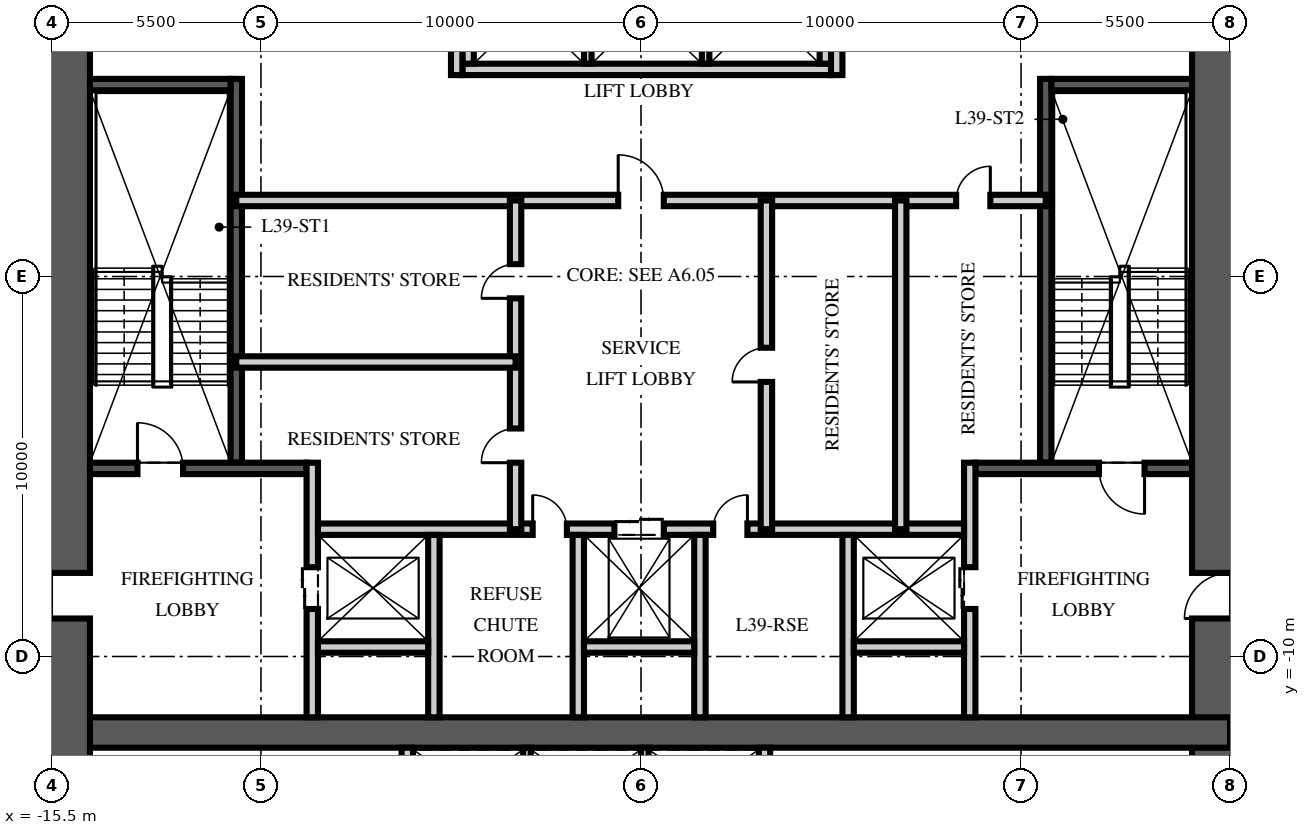
"""IFC4 building model, lengths in metres.
Left out: names, types, materials, properties, quantities, classifications, styles, units other than length and angle.
Written with IfcOpenShell. Run it as: python <this file> out.ifc"""

import sys

from ifc_helpers import new_model, si_unit, direction, frame, frame_2d, origin, place, context, subcontext, project, spatial, rectangle, extrude, element, fill, save


model = new_model("IFC4")
c1 = context("Model", 3, precision=1e-05, world=origin(), true_north=direction((0.0, 1.0)))
c2 = subcontext(c1, "Body", "Model", "MODEL_VIEW")
j1 = project(units=[si_unit("LENGTHUNIT", "METRE"), si_unit("PLANEANGLEUNIT", "RADIAN")], contexts=[c1])
p1 = place(None, origin())
s1 = spatial("IfcSite", under=j1, at=p1, CompositionType="ELEMENT")
p2 = place(p1, origin())
s2 = spatial("IfcBuilding", under=s1, at=p2, CompositionType="ELEMENT")
p3 = place(p2, frame((0.0, 0.0, 156.0)))
s3 = spatial("IfcBuildingStorey", under=s2, at=p3, CompositionType="ELEMENT", Elevation=156.0)
p4 = place(p3, frame((15.5, -15.5, -0.25), z_axis=(0.0, 0.0, 1.0), x_axis=(0.0, 1.0, 0.0)))
e1 = element("IfcWall", 1, at=p4, inside=s3, PredefinedType="SHEAR", context=c2, shape_type="SweptSolid", body=[
    extrude(rectangle(XDim=31.0, YDim=2.0, at=frame_2d((15.5, 0.0))), origin(), (0.0, 0.0, 1.0), 3.75),
])
p5 = place(p4, frame((6.5, 0.0, 0.25)))
e2 = element("IfcOpeningElement", 2, at=p5, cuts=e1, PredefinedType="OPENING", context=c2, shape_type="SweptSolid", body=[
    extrude(rectangle(XDim=1.2, YDim=2.1, at=frame_2d((0.6, 1.05))), frame((0.0, 1.01, 0.0), z_axis=(0.0, -1.0, 0.0), x_axis=(1.0, 0.0, 0.0)), (0.0, 0.0, 1.0), 2.02),
])
p6 = place(p4, frame((23.0, 0.0, 0.25)))
e3 = element("IfcOpeningElement", 3, at=p6, cuts=e1, PredefinedType="OPENING", context=c2, shape_type="SweptSolid", body=[
    extrude(rectangle(XDim=1.8, YDim=2.1, at=frame_2d((0.9, 1.05))), frame((0.0, 1.01, 0.0), z_axis=(0.0, -1.0, 0.0), x_axis=(1.0, 0.0, 0.0)), (0.0, 0.0, 1.0), 2.02),
])
p7 = place(p3, frame((-15.5, -12.0, -0.25), z_axis=(0.0, 0.0, 1.0), x_axis=(1.0, 0.0, 0.0)))
e4 = element("IfcWall", 4, at=p7, inside=s3, PredefinedType="SHEAR", context=c2, shape_type="SweptSolid", body=[
    extrude(rectangle(XDim=31.0, YDim=0.8, at=frame_2d((15.5, 0.0))), origin(), (0.0, 0.0, 1.0), 3.75),
])
p8 = place(p3, frame((-15.5, -15.5, -0.25), z_axis=(0.0, 0.0, 1.0), x_axis=(0.0, 1.0, 0.0)))
e5 = element("IfcWall", 5, at=p8, inside=s3, PredefinedType="SHEAR", context=c2, shape_type="SweptSolid", body=[
    extrude(rectangle(XDim=31.0, YDim=2.0, at=frame_2d((15.5, 0.0))), origin(), (0.0, 0.0, 1.0), 3.75),
])
p9 = place(p8, frame((6.5, 0.0, 0.25)))
e6 = element("IfcOpeningElement", 6, at=p9, cuts=e5, PredefinedType="OPENING", context=c2, shape_type="SweptSolid", body=[
    extrude(rectangle(XDim=1.2, YDim=2.1, at=frame_2d((0.6, 1.05))), frame((0.0, 1.01, 0.0), z_axis=(0.0, -1.0, 0.0), x_axis=(1.0, 0.0, 0.0)), (0.0, 0.0, 1.0), 2.02),
])
p10 = place(p8, frame((23.0, 0.0, 0.25)))
e7 = element("IfcOpeningElement", 7, at=p10, cuts=e5, PredefinedType="OPENING", context=c2, shape_type="SweptSolid", body=[
    extrude(rectangle(XDim=1.8, YDim=2.1, at=frame_2d((0.9, 1.05))), frame((0.0, 1.01, 0.0), z_axis=(0.0, -1.0, 0.0), x_axis=(1.0, 0.0, 0.0)), (0.0, 0.0, 1.0), 2.02),
])
p11 = place(p3, frame((-10.65, -4.9, 0.0), z_axis=(0.0, 0.0, 1.0), x_axis=(0.0, 1.0, 0.0)))
e8 = element("IfcWall", 8, at=p11, inside=s3, PredefinedType="SOLIDWALL", context=c2, shape_type="SweptSolid", body=[
    extrude(rectangle(XDim=10.1, YDim=0.3, at=frame_2d((5.05, 0.0))), origin(), (0.0, 0.0, 1.0), 3.5),
])
p12 = place(p3, frame((-14.5, -5.05, 0.0), z_axis=(0.0, 0.0, 1.0), x_axis=(1.0, 0.0, 0.0)))
e9 = element("IfcWall", 9, at=p12, inside=s3, PredefinedType="SOLIDWALL", context=c2, shape_type="SweptSolid", body=[
    extrude(rectangle(XDim=5.7, YDim=0.3, at=frame_2d((2.85, 0.0))), origin(), (0.0, 0.0, 1.0), 3.5),
])
p13 = place(p12, frame((1.25, 0.0, 0.0)))
e10 = element("IfcOpeningElement", 10, at=p13, cuts=e9, PredefinedType="OPENING", context=c2, shape_type="SweptSolid", body=[
    extrude(rectangle(XDim=1.2, YDim=2.1, at=frame_2d((0.6, 1.05))), frame((0.0, 0.16, 0.0), z_axis=(0.0, -1.0, 0.0), x_axis=(1.0, 0.0, 0.0)), (0.0, 0.0, 1.0), 0.32),
])
p14 = place(p3, frame((-14.5, 5.05, 0.0), z_axis=(0.0, 0.0, 1.0), x_axis=(1.0, 0.0, 0.0)))
e11 = element("IfcWall", 11, at=p14, inside=s3, PredefinedType="SOLIDWALL", context=c2, shape_type="SweptSolid", body=[
    extrude(rectangle(XDim=3.7, YDim=0.3, at=frame_2d((1.85, 0.0))), origin(), (0.0, 0.0, 1.0), 3.5),
])
p15 = place(p3, frame((-8.65, -11.6, 0.0), z_axis=(0.0, 0.0, 1.0), x_axis=(0.0, 1.0, 0.0)))
e12 = element("IfcWall", 12, at=p15, inside=s3, PredefinedType="PARTITIONING", context=c2, shape_type="SweptSolid", body=[
    extrude(rectangle(XDim=6.7, YDim=0.3, at=frame_2d((3.35, 0.0))), origin(), (0.0, 0.0, 1.0), 3.5),
])
p16 = place(p15, frame((2.85, 0.0, 0.0)))
e13 = element("IfcOpeningElement", 13, at=p16, cuts=e12, PredefinedType="OPENING", context=c2, shape_type="SweptSolid", body=[
    extrude(rectangle(XDim=1.1, YDim=2.1, at=frame_2d((0.55, 1.05))), frame((0.0, 0.16, 0.0), z_axis=(0.0, -1.0, 0.0), x_axis=(1.0, 0.0, 0.0)), (0.0, 0.0, 1.0), 0.32),
])
p17 = place(p3, frame((10.65, -4.9, 0.0), z_axis=(0.0, 0.0, 1.0), x_axis=(0.0, 1.0, 0.0)))
e14 = element("IfcWall", 14, at=p17, inside=s3, PredefinedType="SOLIDWALL", context=c2, shape_type="SweptSolid", body=[
    extrude(rectangle(XDim=10.1, YDim=0.3, at=frame_2d((5.05, 0.0))), origin(), (0.0, 0.0, 1.0), 3.5),
])
p18 = place(p3, frame((14.5, -5.05, 0.0), z_axis=(0.0, 0.0, 1.0), x_axis=(-1.0, 0.0, 0.0)))
e15 = element("IfcWall", 15, at=p18, inside=s3, PredefinedType="SOLIDWALL", context=c2, shape_type="SweptSolid", body=[
    extrude(rectangle(XDim=5.7, YDim=0.3, at=frame_2d((2.85, 0.0))), origin(), (0.0, 0.0, 1.0), 3.5),
])
p19 = place(p18, frame((1.25, 0.0, 0.0)))
e16 = element("IfcOpeningElement", 16, at=p19, cuts=e15, PredefinedType="OPENING", context=c2, shape_type="SweptSolid", body=[
    extrude(rectangle(XDim=1.2, YDim=2.1, at=frame_2d((0.6, 1.05))), frame((0.0, 0.16, 0.0), z_axis=(0.0, -1.0, 0.0), x_axis=(1.0, 0.0, 0.0)), (0.0, 0.0, 1.0), 0.32),
])
p20 = place(p3, frame((14.5, 5.05, 0.0), z_axis=(0.0, 0.0, 1.0), x_axis=(-1.0, 0.0, 0.0)))
e17 = element("IfcWall", 17, at=p20, inside=s3, PredefinedType="SOLIDWALL", context=c2, shape_type="SweptSolid", body=[
    extrude(rectangle(XDim=3.7, YDim=0.3, at=frame_2d((1.85, 0.0))), origin(), (0.0, 0.0, 1.0), 3.5),
])
p21 = place(p3, frame((8.65, -11.6, 0.0), z_axis=(0.0, 0.0, 1.0), x_axis=(0.0, 1.0, 0.0)))
e18 = element("IfcWall", 18, at=p21, inside=s3, PredefinedType="PARTITIONING", context=c2, shape_type="SweptSolid", body=[
    extrude(rectangle(XDim=6.7, YDim=0.3, at=frame_2d((3.35, 0.0))), origin(), (0.0, 0.0, 1.0), 3.5),
])
p22 = place(p21, frame((2.85, 0.0, 0.0)))
e19 = element("IfcOpeningElement", 19, at=p22, cuts=e18, PredefinedType="OPENING", context=c2, shape_type="SweptSolid", body=[
    extrude(rectangle(XDim=1.1, YDim=2.1, at=frame_2d((0.55, 1.05))), frame((0.0, 0.16, 0.0), z_axis=(0.0, -1.0, 0.0), x_axis=(1.0, 0.0, 0.0)), (0.0, 0.0, 1.0), 0.32),
])
p23 = place(p3, frame((-8.5, -6.65, 0.0), z_axis=(0.0, 0.0, 1.0), x_axis=(1.0, 0.0, 0.0)))
e20 = element("IfcWall", 20, at=p23, inside=s3, PredefinedType="PARTITIONING", context=c2, shape_type="SweptSolid", body=[
    extrude(rectangle(XDim=17.0, YDim=0.3, at=frame_2d((8.5, 0.0))), origin(), (0.0, 0.0, 1.0), 3.5),
])
p24 = place(p23, frame((7.8, 0.0, 0.0)))
e21 = element("IfcOpeningElement", 21, at=p24, cuts=e20, PredefinedType="OPENING", context=c2, shape_type="SweptSolid", body=[
    extrude(rectangle(XDim=1.3, YDim=2.4, at=frame_2d((0.65, 1.2))), frame((0.0, 0.16, 0.0), z_axis=(0.0, -1.0, 0.0), x_axis=(1.0, 0.0, 0.0)), (0.0, 0.0, 1.0), 0.32),
])
p25 = place(p23, frame((5.65, 0.0, 0.0)))
e22 = element("IfcOpeningElement", 22, at=p25, cuts=e20, PredefinedType="OPENING", context=c2, shape_type="SweptSolid", body=[
    extrude(rectangle(XDim=0.9, YDim=2.1, at=frame_2d((0.45, 1.05))), frame((0.0, 0.16, 0.0), z_axis=(0.0, -1.0, 0.0), x_axis=(1.0, 0.0, 0.0)), (0.0, 0.0, 1.0), 0.32),
])
p26 = place(p23, frame((10.4, 0.0, 0.0)))
e23 = element("IfcOpeningElement", 23, at=p26, cuts=e20, PredefinedType="OPENING", context=c2, shape_type="SweptSolid", body=[
    extrude(rectangle(XDim=0.9, YDim=2.1, at=frame_2d((0.45, 1.05))), frame((0.0, 0.16, 0.0), z_axis=(0.0, -1.0, 0.0), x_axis=(1.0, 0.0, 0.0)), (0.0, 0.0, 1.0), 0.32),
])
for number, where, z_axis, x_axis in (
    (24, (-5.45, -11.6, 0.0), (0.0, 0.0, 1.0), (0.0, 1.0, 0.0)),
    (25, (-1.65, -11.6, 0.0), (0.0, 0.0, 1.0), (0.0, 1.0, 0.0)),
    (26, (1.55, -11.6, 0.0), (0.0, 0.0, 1.0), (0.0, 1.0, 0.0)),
    (27, (5.45, -11.6, 0.0), (0.0, 0.0, 1.0), (0.0, 1.0, 0.0)),
):
    element("IfcWall", number, at=place(p3, frame(where, z_axis=z_axis, x_axis=x_axis)), inside=s3, PredefinedType="PARTITIONING", context=c2, shape_type="SweptSolid", body=[
        extrude(rectangle(XDim=4.8, YDim=0.3, at=frame_2d((2.4, 0.0))), origin(), (0.0, 0.0, 1.0), 3.5),
    ])
for number, where, z_axis, x_axis in (
    (28, (-8.5, -9.75, 0.0), (0.0, 0.0, 1.0), (1.0, 0.0, 0.0)),
    (29, (-1.5, -9.75, 0.0), (0.0, 0.0, 1.0), (1.0, 0.0, 0.0)),
    (30, (5.6, -9.75, 0.0), (0.0, 0.0, 1.0), (1.0, 0.0, 0.0)),
):
    element("IfcWall", number, at=place(p3, frame(where, z_axis=z_axis, x_axis=x_axis)), inside=s3, PredefinedType="PARTITIONING", context=c2, shape_type="SweptSolid", body=[
        extrude(rectangle(XDim=2.9, YDim=0.3, at=frame_2d((1.45, 0.0))), origin(), (0.0, 0.0, 1.0), 3.5),
    ])
p27 = place(p3, frame((-4.7, 5.45, 0.0), z_axis=(0.0, 0.0, 1.0), x_axis=(1.0, 0.0, 0.0)))
e31 = element("IfcWall", 31, at=p27, inside=s3, PredefinedType="PARTITIONING", context=c2, shape_type="SweptSolid", body=[
    extrude(rectangle(XDim=9.7, YDim=0.3, at=frame_2d((4.85, 0.0))), origin(), (0.0, 0.0, 1.0), 3.5),
])
for number, where, z_axis, x_axis in (
    (32, (-4.55, 5.6, 0.0), (0.0, 0.0, 1.0), (0.0, 1.0, 0.0)),
    (33, (4.85, 5.6, 0.0), (0.0, 0.0, 1.0), (0.0, 1.0, 0.0)),
):
    element("IfcWall", number, at=place(p3, frame(where, z_axis=z_axis, x_axis=x_axis)), inside=s3, PredefinedType="PARTITIONING", context=c2, shape_type="SweptSolid", body=[
        extrude(rectangle(XDim=2.8, YDim=0.3, at=frame_2d((1.4, 0.0))), origin(), (0.0, 0.0, 1.0), 3.5),
    ])
for number, where, z_axis, x_axis in (
    (34, (-1.4, 5.6, 0.0), (0.0, 0.0, 1.0), (0.0, 1.0, 0.0)),
    (35, (1.7, 5.6, 0.0), (0.0, 0.0, 1.0), (0.0, 1.0, 0.0)),
):
    element("IfcWall", number, at=place(p3, frame(where, z_axis=z_axis, x_axis=x_axis)), inside=s3, PredefinedType="PARTITIONING", context=c2, shape_type="SweptSolid", body=[
        extrude(rectangle(XDim=2.8, YDim=0.2, at=frame_2d((1.4, 0.0))), origin(), (0.0, 0.0, 1.0), 3.5),
    ])
for number, where, z_axis, x_axis in (
    (36, (-6.15, -14.5, 0.0), (0.0, 0.0, 1.0), (0.0, 1.0, 0.0)),
    (37, (3.25, -14.5, 0.0), (0.0, 0.0, 1.0), (0.0, 1.0, 0.0)),
):
    element("IfcWall", number, at=place(p3, frame(where, z_axis=z_axis, x_axis=x_axis)), inside=s3, PredefinedType="PARTITIONING", context=c2, shape_type="SweptSolid", body=[
        extrude(rectangle(XDim=2.1, YDim=0.3, at=frame_2d((1.05, 0.0))), origin(), (0.0, 0.0, 1.0), 3.5),
    ])
for number, where, z_axis, x_axis in (
    (38, (-3.0, -14.5, 0.0), (0.0, 0.0, 1.0), (0.0, 1.0, 0.0)),
    (39, (0.1, -14.5, 0.0), (0.0, 0.0, 1.0), (0.0, 1.0, 0.0)),
):
    element("IfcWall", number, at=place(p3, frame(where, z_axis=z_axis, x_axis=x_axis)), inside=s3, PredefinedType="PARTITIONING", context=c2, shape_type="SweptSolid", body=[
        extrude(rectangle(XDim=2.1, YDim=0.2, at=frame_2d((1.05, 0.0))), origin(), (0.0, 0.0, 1.0), 3.5),
    ])
p28 = place(p3, frame((-10.65, 2.0, 0.0), z_axis=(0.0, 0.0, 1.0), x_axis=(1.0, 0.0, 0.0)))
e40 = element("IfcWall", 40, at=p28, inside=s3, PredefinedType="PARTITIONING", context=c2, shape_type="SweptSolid", body=[
    extrude(rectangle(XDim=21.3, YDim=0.3, at=frame_2d((10.65, 0.0))), origin(), (0.0, 0.0, 1.0), 3.5),
])
p29 = place(p28, frame((10.05, 0.0, 0.0)))
e41 = element("IfcOpeningElement", 41, at=p29, cuts=e40, PredefinedType="OPENING", context=c2, shape_type="SweptSolid", body=[
    extrude(rectangle(XDim=1.2, YDim=2.1, at=frame_2d((0.6, 1.05))), frame((0.0, 0.16, 0.0), z_axis=(0.0, -1.0, 0.0), x_axis=(1.0, 0.0, 0.0)), (0.0, 0.0, 1.0), 0.32),
])
p30 = place(p28, frame((18.942, 0.0, 0.0)))
e42 = element("IfcOpeningElement", 42, at=p30, cuts=e40, PredefinedType="OPENING", context=c2, shape_type="SweptSolid", body=[
    extrude(rectangle(XDim=0.9, YDim=2.1, at=frame_2d((0.45, 1.05))), frame((0.0, 0.16, 0.0), z_axis=(0.0, -1.0, 0.0), x_axis=(1.0, 0.0, 0.0)), (0.0, 0.0, 1.0), 0.32),
])
p31 = place(p3, frame((-3.3, -6.65, 0.0), z_axis=(0.0, 0.0, 1.0), x_axis=(0.0, 1.0, 0.0)))
e43 = element("IfcWall", 43, at=p31, inside=s3, PredefinedType="PARTITIONING", context=c2, shape_type="SweptSolid", body=[
    extrude(rectangle(XDim=8.65, YDim=0.3, at=frame_2d((4.325, 0.0))), origin(), (0.0, 0.0, 1.0), 3.5),
])
p32 = place(p31, frame((1.75, 0.0, 0.0)))
e44 = element("IfcOpeningElement", 44, at=p32, cuts=e43, PredefinedType="OPENING", context=c2, shape_type="SweptSolid", body=[
    extrude(rectangle(XDim=0.9, YDim=2.1, at=frame_2d((0.45, 1.05))), frame((0.0, 0.16, 0.0), z_axis=(0.0, -1.0, 0.0), x_axis=(1.0, 0.0, 0.0)), (0.0, 0.0, 1.0), 0.32),
])
p33 = place(p31, frame((6.075, 0.0, 0.0)))
e45 = element("IfcOpeningElement", 45, at=p33, cuts=e43, PredefinedType="OPENING", context=c2, shape_type="SweptSolid", body=[
    extrude(rectangle(XDim=0.9, YDim=2.1, at=frame_2d((0.45, 1.05))), frame((0.0, 0.16, 0.0), z_axis=(0.0, -1.0, 0.0), x_axis=(1.0, 0.0, 0.0)), (0.0, 0.0, 1.0), 0.32),
])
p34 = place(p3, frame((3.3, -6.65, 0.0), z_axis=(0.0, 0.0, 1.0), x_axis=(0.0, 1.0, 0.0)))
e46 = element("IfcWall", 46, at=p34, inside=s3, PredefinedType="PARTITIONING", context=c2, shape_type="SweptSolid", body=[
    extrude(rectangle(XDim=8.65, YDim=0.3, at=frame_2d((4.325, 0.0))), origin(), (0.0, 0.0, 1.0), 3.5),
])
p35 = place(p34, frame((3.875, 0.0, 0.0)))
e47 = element("IfcOpeningElement", 47, at=p35, cuts=e46, PredefinedType="OPENING", context=c2, shape_type="SweptSolid", body=[
    extrude(rectangle(XDim=0.9, YDim=2.1, at=frame_2d((0.45, 1.05))), frame((0.0, 0.16, 0.0), z_axis=(0.0, -1.0, 0.0), x_axis=(1.0, 0.0, 0.0)), (0.0, 0.0, 1.0), 0.32),
])
p36 = place(p3, frame((-10.65, -2.25, 0.0), z_axis=(0.0, 0.0, 1.0), x_axis=(1.0, 0.0, 0.0)))
e48 = element("IfcWall", 48, at=p36, inside=s3, PredefinedType="PARTITIONING", context=c2, shape_type="SweptSolid", body=[
    extrude(rectangle(XDim=7.35, YDim=0.3, at=frame_2d((3.675, 0.0))), origin(), (0.0, 0.0, 1.0), 3.5),
])
p37 = place(p3, frame((6.834, -6.65, 0.0), z_axis=(0.0, 0.0, 1.0), x_axis=(0.0, 1.0, 0.0)))
e49 = element("IfcWall", 49, at=p37, inside=s3, PredefinedType="PARTITIONING", context=c2, shape_type="SweptSolid", body=[
    extrude(rectangle(XDim=8.65, YDim=0.3, at=frame_2d((4.325, 0.0))), origin(), (0.0, 0.0, 1.0), 3.5),
])
p38 = place(p3, frame((-4.85, 5.3, 0.0), z_axis=(0.0, 0.0, 1.0), x_axis=(0.0, 1.0, 0.0)))
e50 = element("IfcWall", 50, at=p38, inside=s3, PredefinedType="PARTITIONING", context=c2, shape_type="SweptSolid", body=[
    extrude(rectangle(XDim=6.3, YDim=0.3, at=frame_2d((3.15, 0.0))), origin(), (0.0, 0.0, 1.0), 3.5),
])
p39 = place(p3, frame((5.15, 5.3, 0.0), z_axis=(0.0, 0.0, 1.0), x_axis=(0.0, 1.0, 0.0)))
e51 = element("IfcWall", 51, at=p39, inside=s3, PredefinedType="PARTITIONING", context=c2, shape_type="SweptSolid", body=[
    extrude(rectangle(XDim=6.3, YDim=0.3, at=frame_2d((3.15, 0.0))), origin(), (0.0, 0.0, 1.0), 3.5),
])
p40 = place(p39, frame((4.35, 0.0, 0.0)))
e52 = element("IfcOpeningElement", 52, at=p40, cuts=e51, PredefinedType="OPENING", context=c2, shape_type="SweptSolid", body=[
    extrude(rectangle(XDim=0.9, YDim=2.1, at=frame_2d((0.45, 1.05))), frame((0.0, 0.16, 0.0), z_axis=(0.0, -1.0, 0.0), x_axis=(1.0, 0.0, 0.0)), (0.0, 0.0, 1.0), 0.32),
])
p41 = place(p13, origin())
e53 = element("IfcDoor", 53, at=p41, inside=s3, OperationType="SINGLE_SWING_LEFT", PredefinedType="DOOR", context=c2, shape_type="SweptSolid", body=[
    extrude(rectangle(XDim=1.2, YDim=2.1, at=frame_2d((0.6, 1.05))), frame((0.0, 0.025, 0.0), z_axis=(0.0, -1.0, 0.0), x_axis=(1.0, 0.0, 0.0)), (0.0, 0.0, 1.0), 0.05),
])
fill(e10, e53)
p42 = place(p9, origin())
e54 = element("IfcDoor", 54, at=p42, inside=s3, OperationType="SINGLE_SWING_LEFT", PredefinedType="DOOR", context=c2, shape_type="SweptSolid", body=[
    extrude(rectangle(XDim=1.2, YDim=2.1, at=frame_2d((0.6, 1.05))), frame((0.0, 0.025, 0.0), z_axis=(0.0, -1.0, 0.0), x_axis=(1.0, 0.0, 0.0)), (0.0, 0.0, 1.0), 0.05),
])
fill(e6, e54)
p43 = place(p19, origin())
e55 = element("IfcDoor", 55, at=p43, inside=s3, OperationType="SINGLE_SWING_LEFT", PredefinedType="DOOR", context=c2, shape_type="SweptSolid", body=[
    extrude(rectangle(XDim=1.2, YDim=2.1, at=frame_2d((0.6, 1.05))), frame((0.0, 0.025, 0.0), z_axis=(0.0, -1.0, 0.0), x_axis=(1.0, 0.0, 0.0)), (0.0, 0.0, 1.0), 0.05),
])
fill(e16, e55)
p44 = place(p5, origin())
e56 = element("IfcDoor", 56, at=p44, inside=s3, OperationType="SINGLE_SWING_LEFT", PredefinedType="DOOR", context=c2, shape_type="SweptSolid", body=[
    extrude(rectangle(XDim=1.2, YDim=2.1, at=frame_2d((0.6, 1.05))), frame((0.0, 0.025, 0.0), z_axis=(0.0, -1.0, 0.0), x_axis=(1.0, 0.0, 0.0)), (0.0, 0.0, 1.0), 0.05),
])
fill(e2, e56)
p45 = place(p16, origin())
e57 = element("IfcDoor", 57, at=p45, inside=s3, OperationType="DOUBLE_DOOR_SLIDING", PredefinedType="DOOR", context=c2, shape_type="SweptSolid", body=[
    extrude(rectangle(XDim=1.1, YDim=2.1, at=frame_2d((0.55, 1.05))), frame((0.0, 0.025, 0.0), z_axis=(0.0, -1.0, 0.0), x_axis=(1.0, 0.0, 0.0)), (0.0, 0.0, 1.0), 0.05),
])
fill(e13, e57)
p46 = place(p22, origin())
e58 = element("IfcDoor", 58, at=p46, inside=s3, OperationType="DOUBLE_DOOR_SLIDING", PredefinedType="DOOR", context=c2, shape_type="SweptSolid", body=[
    extrude(rectangle(XDim=1.1, YDim=2.1, at=frame_2d((0.55, 1.05))), frame((0.0, 0.025, 0.0), z_axis=(0.0, -1.0, 0.0), x_axis=(1.0, 0.0, 0.0)), (0.0, 0.0, 1.0), 0.05),
])
fill(e19, e58)
p47 = place(p24, origin())
e59 = element("IfcDoor", 59, at=p47, inside=s3, OperationType="DOUBLE_DOOR_SLIDING", PredefinedType="DOOR", context=c2, shape_type="SweptSolid", body=[
    extrude(rectangle(XDim=1.3, YDim=2.4, at=frame_2d((0.65, 1.2))), frame((0.0, 0.025, 0.0), z_axis=(0.0, -1.0, 0.0), x_axis=(1.0, 0.0, 0.0)), (0.0, 0.0, 1.0), 0.05),
])
fill(e21, e59)
p48 = place(p29, origin())
e60 = element("IfcDoor", 60, at=p48, inside=s3, OperationType="SINGLE_SWING_LEFT", PredefinedType="DOOR", context=c2, shape_type="SweptSolid", body=[
    extrude(rectangle(XDim=1.2, YDim=2.1, at=frame_2d((0.6, 1.05))), frame((0.0, 0.025, 0.0), z_axis=(0.0, -1.0, 0.0), x_axis=(1.0, 0.0, 0.0)), (0.0, 0.0, 1.0), 0.05),
])
fill(e41, e60)
p49 = place(p25, origin())
e61 = element("IfcDoor", 61, at=p49, inside=s3, OperationType="SINGLE_SWING_LEFT", PredefinedType="DOOR", context=c2, shape_type="SweptSolid", body=[
    extrude(rectangle(XDim=0.9, YDim=2.1, at=frame_2d((0.45, 1.05))), frame((0.0, 0.025, 0.0), z_axis=(0.0, -1.0, 0.0), x_axis=(1.0, 0.0, 0.0)), (0.0, 0.0, 1.0), 0.05),
])
fill(e22, e61)
p50 = place(p26, origin())
e62 = element("IfcDoor", 62, at=p50, inside=s3, OperationType="SINGLE_SWING_RIGHT", PredefinedType="DOOR", context=c2, shape_type="SweptSolid", body=[
    extrude(rectangle(XDim=0.9, YDim=2.1, at=frame_2d((0.45, 1.05))), frame((0.0, 0.025, 0.0), z_axis=(0.0, -1.0, 0.0), x_axis=(1.0, 0.0, 0.0)), (0.0, 0.0, 1.0), 0.05),
])
fill(e23, e62)
p51 = place(p32, origin())
e63 = element("IfcDoor", 63, at=p51, inside=s3, OperationType="SINGLE_SWING_LEFT", PredefinedType="DOOR", context=c2, shape_type="SweptSolid", body=[
    extrude(rectangle(XDim=0.9, YDim=2.1, at=frame_2d((0.45, 1.05))), frame((0.0, 0.025, 0.0), z_axis=(0.0, -1.0, 0.0), x_axis=(1.0, 0.0, 0.0)), (0.0, 0.0, 1.0), 0.05),
])
fill(e44, e63)
p52 = place(p33, origin())
e64 = element("IfcDoor", 64, at=p52, inside=s3, OperationType="SINGLE_SWING_LEFT", PredefinedType="DOOR", context=c2, shape_type="SweptSolid", body=[
    extrude(rectangle(XDim=0.9, YDim=2.1, at=frame_2d((0.45, 1.05))), frame((0.0, 0.025, 0.0), z_axis=(0.0, -1.0, 0.0), x_axis=(1.0, 0.0, 0.0)), (0.0, 0.0, 1.0), 0.05),
])
fill(e45, e64)
p53 = place(p35, origin())
e65 = element("IfcDoor", 65, at=p53, inside=s3, OperationType="SINGLE_SWING_LEFT", PredefinedType="DOOR", context=c2, shape_type="SweptSolid", body=[
    extrude(rectangle(XDim=0.9, YDim=2.1, at=frame_2d((0.45, 1.05))), frame((0.0, 0.025, 0.0), z_axis=(0.0, -1.0, 0.0), x_axis=(1.0, 0.0, 0.0)), (0.0, 0.0, 1.0), 0.05),
])
fill(e47, e65)
p54 = place(p30, origin())
e66 = element("IfcDoor", 66, at=p54, inside=s3, OperationType="SINGLE_SWING_RIGHT", PredefinedType="DOOR", context=c2, shape_type="SweptSolid", body=[
    extrude(rectangle(XDim=0.9, YDim=2.1, at=frame_2d((0.45, 1.05))), frame((0.0, 0.025, 0.0), z_axis=(0.0, -1.0, 0.0), x_axis=(1.0, 0.0, 0.0)), (0.0, 0.0, 1.0), 0.05),
])
fill(e42, e66)
save(model, sys.argv[1])
